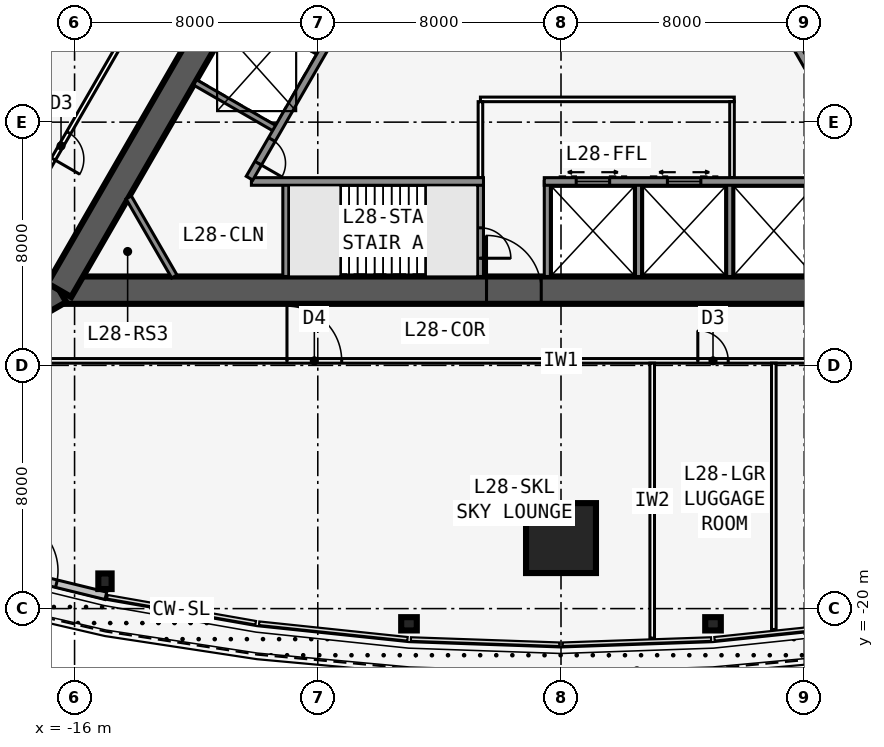
"""IFC4 building model, lengths in metres.
Left out: names, types, materials, properties, quantities, classifications, styles, units other than length and angle.
Written with IfcOpenShell. Run it as: python <this file> out.ifc"""

import sys

from ifc_helpers import new_model, si_unit, direction, frame, frame_2d, origin, origin_2d, place, context, subcontext, project, spatial, rectangle, i_section, extrude, element, fill, save


model = new_model("IFC4")
c1 = context("Model", 3, precision=1e-05, world=origin(), true_north=direction((0.0, 1.0)))
c2 = subcontext(c1, "Body", "Model", "MODEL_VIEW")
j1 = project(units=[si_unit("LENGTHUNIT", "METRE"), si_unit("PLANEANGLEUNIT", "RADIAN")], contexts=[c1])
p1 = place(None, origin())
s1 = spatial("IfcSite", under=j1, at=p1, CompositionType="ELEMENT")
p2 = place(p1, origin())
s2 = spatial("IfcBuilding", under=s1, at=p2, CompositionType="ELEMENT")
p3 = place(p2, frame((0.0, 0.0, 109.7)))
s3 = spatial("IfcBuildingStorey", under=s2, at=p3, CompositionType="ELEMENT", Elevation=109.7)
p4 = place(p3, frame((-16.5, -9.526, 0.0), z_axis=(0.0, 0.0, 1.0), x_axis=(1.0, 0.0, 0.0)))
e1 = element("IfcWall", 1, at=p4, inside=s3, PredefinedType="SHEAR", context=c2, shape_type="SweptSolid", body=[
    extrude(rectangle(XDim=33.0, YDim=0.9, at=frame_2d((16.5, 0.0))), origin(), (0.0, 0.0, 1.0), 5.0),
])
p5 = place(p4, frame((14.05, 0.0, 0.0)))
e2 = element("IfcOpeningElement", 2, at=p5, cuts=e1, PredefinedType="OPENING", context=c2, shape_type="SweptSolid", body=[
    extrude(rectangle(XDim=1.8, YDim=2.13, at=frame_2d((0.9, 1.065))), frame((0.0, 0.46, 0.0), z_axis=(0.0, -1.0, 0.0), x_axis=(1.0, 0.0, 0.0)), (0.0, 0.0, 1.0), 0.92),
])
p6 = place(p3, frame((-10.183, -5.951, 0.0), z_axis=(0.0, 0.0, 1.0), x_axis=(1.0, 0.0, 0.0)))
e3 = element("IfcWall", 3, at=p6, inside=s3, PredefinedType="SOLIDWALL", context=c2, shape_type="SweptSolid", body=[
    extrude(rectangle(XDim=7.633, YDim=0.25, at=frame_2d((3.816, 0.0))), origin(), (0.0, 0.0, 1.0), 4.835),
])
p7 = place(p3, frame((-0.55, -5.951, 0.0), z_axis=(0.0, 0.0, 1.0), x_axis=(1.0, 0.0, 0.0)))
e4 = element("IfcWall", 4, at=p7, inside=s3, PredefinedType="SOLIDWALL", context=c2, shape_type="SweptSolid", body=[
    extrude(rectangle(XDim=10.733, YDim=0.25, at=frame_2d((5.366, 0.0))), origin(), (0.0, 0.0, 1.0), 4.835),
])
p8 = place(p7, frame((9.314, 0.0, 0.0)))
e5 = element("IfcOpeningElement", 5, at=p8, cuts=e4, PredefinedType="OPENING", context=c2, shape_type="SweptSolid", body=[
    extrude(rectangle(XDim=0.9, YDim=2.13, at=frame_2d((0.45, 1.065))), frame((0.0, 0.135, 0.0), z_axis=(0.0, -1.0, 0.0), x_axis=(1.0, 0.0, 0.0)), (0.0, 0.0, 1.0), 0.27),
])
p9 = place(p7, frame((1.05, 0.0, 0.0)))
e6 = element("IfcOpeningElement", 6, at=p9, cuts=e4, PredefinedType="OPENING", context=c2, shape_type="SweptSolid", body=[
    extrude(rectangle(XDim=1.1, YDim=2.13, at=frame_2d((0.55, 1.065))), frame((0.0, 0.135, 0.0), z_axis=(0.0, -1.0, 0.0), x_axis=(1.0, 0.0, 0.0)), (0.0, 0.0, 1.0), 0.27),
])
p10 = place(p7, frame((4.05, 0.0, 0.0)))
e7 = element("IfcOpeningElement", 7, at=p10, cuts=e4, PredefinedType="OPENING", context=c2, shape_type="SweptSolid", body=[
    extrude(rectangle(XDim=1.1, YDim=2.13, at=frame_2d((0.55, 1.065))), frame((0.0, 0.135, 0.0), z_axis=(0.0, -1.0, 0.0), x_axis=(1.0, 0.0, 0.0)), (0.0, 0.0, 1.0), 0.27),
])
p11 = place(p3, frame((-9.05, -5.951, 0.0), z_axis=(0.0, 0.0, 1.0), x_axis=(0.0, -1.0, 0.0)))
e8 = element("IfcWall", 8, at=p11, inside=s3, PredefinedType="SOLIDWALL", context=c2, shape_type="SweptSolid", body=[
    extrude(rectangle(XDim=3.125, YDim=0.2, at=frame_2d((1.562, 0.0))), origin(), (0.0, 0.0, 1.0), 4.835),
])
p12 = place(p3, frame((-2.65, -5.951, 0.0), z_axis=(0.0, 0.0, 1.0), x_axis=(0.0, -1.0, 0.0)))
e9 = element("IfcWall", 9, at=p12, inside=s3, PredefinedType="SOLIDWALL", context=c2, shape_type="SweptSolid", body=[
    extrude(rectangle(XDim=3.125, YDim=0.2, at=frame_2d((1.562, 0.0))), origin(), (0.0, 0.0, 1.0), 4.835),
])
p13 = place(p12, frame((1.525, 0.0, 0.0)))
e10 = element("IfcOpeningElement", 10, at=p13, cuts=e9, PredefinedType="OPENING", context=c2, shape_type="SweptSolid", body=[
    extrude(rectangle(XDim=1.0, YDim=2.13, at=frame_2d((0.5, 1.065))), frame((0.0, 0.11, 0.0), z_axis=(0.0, -1.0, 0.0), x_axis=(1.0, 0.0, 0.0)), (0.0, 0.0, 1.0), 0.22),
])
for number, where, z_axis, x_axis in (
    (11, (-0.45, -5.951, 0.0), (0.0, 0.0, 1.0), (0.0, -1.0, 0.0)),
    (12, (2.55, -5.951, 0.0), (0.0, 0.0, 1.0), (0.0, -1.0, 0.0)),
    (13, (5.55, -5.951, 0.0), (0.0, 0.0, 1.0), (0.0, -1.0, 0.0)),
):
    element("IfcWall", number, at=place(p3, frame(where, z_axis=z_axis, x_axis=x_axis)), inside=s3, PredefinedType="SOLIDWALL", context=c2, shape_type="SweptSolid", body=[
        extrude(rectangle(XDim=3.125, YDim=0.2, at=frame_2d((1.562, 0.0))), origin(), (0.0, 0.0, 1.0), 4.835),
    ])
p14 = place(p3, frame((16.5, -9.526, 0.0), z_axis=(0.0, 0.0, 1.0), x_axis=(-0.499999749417, 0.866025548458, 0.0)))
e14 = element("IfcWall", 14, at=p14, inside=s3, PredefinedType="SHEAR", context=c2, shape_type="SweptSolid", body=[
    extrude(rectangle(XDim=33.0, YDim=0.9, at=frame_2d((16.5, 0.0))), origin(), (0.0, 0.0, 1.0), 5.0),
])
p15 = place(p14, frame((14.15, 0.0, 0.0)))
e15 = element("IfcOpeningElement", 15, at=p15, cuts=e14, PredefinedType="OPENING", context=c2, shape_type="SweptSolid", body=[
    extrude(rectangle(XDim=1.8, YDim=2.13, at=frame_2d((0.9, 1.065))), frame((0.0, 0.46, 0.0), z_axis=(0.0, -1.0, 0.0), x_axis=(1.0, 0.0, 0.0)), (0.0, 0.0, 1.0), 0.92),
])
p16 = place(p14, frame((12.6, 0.0, 0.0)))
e16 = element("IfcOpeningElement", 16, at=p16, cuts=e14, PredefinedType="OPENING", context=c2, shape_type="SweptSolid", body=[
    extrude(rectangle(XDim=1.0, YDim=2.13, at=frame_2d((0.5, 1.065))), frame((0.0, 0.46, 0.0), z_axis=(0.0, -1.0, 0.0), x_axis=(1.0, 0.0, 0.0)), (0.0, 0.0, 1.0), 0.92),
])
p17 = place(p3, frame((10.245, -5.843, 0.0), z_axis=(0.0, 0.0, 1.0), x_axis=(-0.499993009313, 0.866029439822, 0.0)))
e17 = element("IfcWall", 17, at=p17, inside=s3, PredefinedType="SOLIDWALL", context=c2, shape_type="SweptSolid", body=[
    extrude(rectangle(XDim=7.733, YDim=0.25, at=frame_2d((3.866, 0.0))), origin(), (0.0, 0.0, 1.0), 4.835),
])
p18 = place(p3, frame((0.0, 19.052, 0.0), z_axis=(0.0, 0.0, 1.0), x_axis=(-0.499999749417, -0.866025548458, 0.0)))
e18 = element("IfcWall", 18, at=p18, inside=s3, PredefinedType="SHEAR", context=c2, shape_type="SweptSolid", body=[
    extrude(rectangle(XDim=33.0, YDim=0.9, at=frame_2d((16.5, 0.0))), origin(), (0.0, 0.0, 1.0), 5.0),
])
p19 = place(p18, frame((14.15, 0.0, 0.0)))
e19 = element("IfcOpeningElement", 19, at=p19, cuts=e18, PredefinedType="OPENING", context=c2, shape_type="SweptSolid", body=[
    extrude(rectangle(XDim=1.8, YDim=2.13, at=frame_2d((0.9, 1.065))), frame((0.0, 0.46, 0.0), z_axis=(0.0, -1.0, 0.0), x_axis=(1.0, 0.0, 0.0)), (0.0, 0.0, 1.0), 0.92),
])
p20 = place(p18, frame((12.6, 0.0, 0.0)))
e20 = element("IfcOpeningElement", 20, at=p20, cuts=e18, PredefinedType="OPENING", context=c2, shape_type="SweptSolid", body=[
    extrude(rectangle(XDim=1.0, YDim=2.13, at=frame_2d((0.5, 1.065))), frame((0.0, 0.46, 0.0), z_axis=(0.0, -1.0, 0.0), x_axis=(1.0, 0.0, 0.0)), (0.0, 0.0, 1.0), 0.92),
])
p21 = place(p3, frame((-4.929, 3.365, 0.0), z_axis=(0.0, 0.0, 1.0), x_axis=(-0.499991433582, -0.866030349552, 0.0)))
e21 = element("IfcWall", 21, at=p21, inside=s3, PredefinedType="SOLIDWALL", context=c2, shape_type="SweptSolid", body=[
    extrude(rectangle(XDim=10.633, YDim=0.25, at=frame_2d((5.316, 0.0))), origin(), (0.0, 0.0, 1.0), 4.835),
])
p22 = place(p21, frame((9.164, 0.0, 0.0)))
e22 = element("IfcOpeningElement", 22, at=p22, cuts=e21, PredefinedType="OPENING", context=c2, shape_type="SweptSolid", body=[
    extrude(rectangle(XDim=0.9, YDim=2.13, at=frame_2d((0.45, 1.065))), frame((0.0, 0.135, 0.0), z_axis=(0.0, -1.0, 0.0), x_axis=(1.0, 0.0, 0.0)), (0.0, 0.0, 1.0), 0.27),
])
p23 = place(p21, frame((1.0, 0.0, 0.0)))
e23 = element("IfcOpeningElement", 23, at=p23, cuts=e21, PredefinedType="OPENING", context=c2, shape_type="SweptSolid", body=[
    extrude(rectangle(XDim=1.1, YDim=2.13, at=frame_2d((0.55, 1.065))), frame((0.0, 0.135, 0.0), z_axis=(0.0, -1.0, 0.0), x_axis=(1.0, 0.0, 0.0)), (0.0, 0.0, 1.0), 0.27),
])
p24 = place(p21, frame((3.9, 0.0, 0.0)))
e24 = element("IfcOpeningElement", 24, at=p24, cuts=e21, PredefinedType="OPENING", context=c2, shape_type="SweptSolid", body=[
    extrude(rectangle(XDim=1.1, YDim=2.13, at=frame_2d((0.55, 1.065))), frame((0.0, 0.135, 0.0), z_axis=(0.0, -1.0, 0.0), x_axis=(1.0, 0.0, 0.0)), (0.0, 0.0, 1.0), 0.27),
])
for number, where, z_axis, x_axis in (
    (25, (-7.879, -1.744, 0.0), (0.0, 0.0, 1.0), (-0.866, 0.5, 0.0)),
    (26, (-9.329, -4.256, 0.0), (0.0, 0.0, 1.0), (-0.866, 0.5, 0.0)),
):
    element("IfcWall", number, at=place(p3, frame(where, z_axis=z_axis, x_axis=x_axis)), inside=s3, PredefinedType="SOLIDWALL", context=c2, shape_type="SweptSolid", body=[
        extrude(rectangle(XDim=3.125, YDim=0.2, at=frame_2d((1.562, 0.0))), origin(), (0.0, 0.0, 1.0), 4.835),
    ])
p25 = place(p3, frame((-16.5, -9.526, 0.0), z_axis=(0.0, 0.0, 1.0), x_axis=(-0.866031398331, -0.499989616998, 0.0)))
e27 = element("IfcWall", 27, at=p25, inside=s3, PredefinedType="SHEAR", context=c2, shape_type="SweptSolid", body=[
    extrude(rectangle(XDim=4.746, YDim=0.9, at=frame_2d((2.373, 0.0))), origin(), (0.0, 0.0, 1.0), 5.0),
])
p26 = place(p25, frame((1.8, 0.0, 0.0)))
e28 = element("IfcOpeningElement", 28, at=p26, cuts=e27, PredefinedType="OPENING", context=c2, shape_type="SweptSolid", body=[
    extrude(rectangle(XDim=1.8, YDim=2.13, at=frame_2d((0.9, 1.065))), frame((0.0, 0.46, 0.0), z_axis=(0.0, -1.0, 0.0), x_axis=(1.0, 0.0, 0.0)), (0.0, 0.0, 1.0), 0.92),
])
for number, where, z_axis, x_axis in (
    (29, (-15.0, -19.1, 0.0), (0.0, 0.0, 1.0), (1.0, 0.0, 0.0)),
    (30, (-5.0, -20.5, 0.0), (0.0, 0.0, 1.0), (0.0, -1.0, 0.0)),
    (31, (5.0, -20.5, 0.0), (0.0, 0.0, 1.0), (0.0, -1.0, 0.0)),
):
    element("IfcColumn", number, at=place(p3, frame(where, z_axis=z_axis, x_axis=x_axis)), inside=s3, PredefinedType="COLUMN", context=c2, shape_type="SweptSolid", body=[
        extrude(i_section(OverallWidth=0.437, OverallDepth=0.513, WebThickness=0.061, FlangeThickness=0.097, at=origin_2d()), origin(), (0.0, 0.0, 1.0), 5.0),
    ])
p27 = place(p3, frame((0.0, -17.68, 0.0), z_axis=(0.0, 0.0, 1.0), x_axis=(0.0, -1.0, 0.0)))
e32 = element("IfcColumn", 32, at=p27, inside=s3, PredefinedType="COLUMN", context=c2, shape_type="SweptSolid", body=[
    extrude(rectangle(XDim=2.3, YDim=2.3, at=origin_2d()), origin(), (0.0, 0.0, 1.0), 5.0),
])
p28 = place(p3, frame((-19.97, -18.354, 0.0), z_axis=(0.0, 0.0, 1.0), x_axis=(0.971270024053, -0.237980126011, 0.0)))
e33 = element("IfcWall", 33, at=p28, inside=s3, PredefinedType="STANDARD", context=c2, shape_type="SweptSolid", body=[
    extrude(rectangle(XDim=5.148, YDim=0.25, at=frame_2d((2.574, 0.0))), origin(), (0.0, 0.0, 1.0), 4.835),
])
p29 = place(p28, frame((1.674, 0.0, 0.0)))
e34 = element("IfcOpeningElement", 34, at=p29, cuts=e33, PredefinedType="OPENING", context=c2, shape_type="SweptSolid", body=[
    extrude(rectangle(XDim=1.8, YDim=2.4, at=frame_2d((0.9, 1.2))), frame((0.0, 0.135, 0.0), z_axis=(0.0, -1.0, 0.0), x_axis=(1.0, 0.0, 0.0)), (0.0, 0.0, 1.0), 0.27),
])
p30 = place(p3, frame((-19.527, -11.851, 0.0), z_axis=(0.0, 0.0, 1.0), x_axis=(1.0, 0.0, 0.0)))
e35 = element("IfcWall", 35, at=p30, inside=s3, PredefinedType="PARTITIONING", context=c2, shape_type="SweptSolid", body=[
    extrude(rectangle(XDim=39.054, YDim=0.15, at=frame_2d((19.527, 0.0))), origin(), (0.0, 0.0, 1.0), 4.835),
])
p31 = place(p30, frame((10.513, 0.0, 0.0)))
e36 = element("IfcOpeningElement", 36, at=p31, cuts=e35, PredefinedType="OPENING", context=c2, shape_type="SweptSolid", body=[
    extrude(rectangle(XDim=1.8, YDim=2.13, at=frame_2d((0.9, 1.065))), frame((0.0, 0.085, 0.0), z_axis=(0.0, -1.0, 0.0), x_axis=(1.0, 0.0, 0.0)), (0.0, 0.0, 1.0), 0.17),
])
p32 = place(p30, frame((24.027, 0.0, 0.0)))
e37 = element("IfcOpeningElement", 37, at=p32, cuts=e35, PredefinedType="OPENING", context=c2, shape_type="SweptSolid", body=[
    extrude(rectangle(XDim=1.0, YDim=2.13, at=frame_2d((0.5, 1.065))), frame((0.0, 0.085, 0.0), z_axis=(0.0, -1.0, 0.0), x_axis=(1.0, 0.0, 0.0)), (0.0, 0.0, 1.0), 0.17),
])
p33 = place(p30, frame((31.74, 0.0, 0.0)))
e38 = element("IfcOpeningElement", 38, at=p33, cuts=e35, PredefinedType="OPENING", context=c2, shape_type="SweptSolid", body=[
    extrude(rectangle(XDim=1.8, YDim=2.13, at=frame_2d((0.9, 1.065))), frame((0.0, 0.085, 0.0), z_axis=(0.0, -1.0, 0.0), x_axis=(1.0, 0.0, 0.0)), (0.0, 0.0, 1.0), 0.17),
])
p34 = place(p3, frame((3.0, -11.926, 0.0), z_axis=(0.0, 0.0, 1.0), x_axis=(0.0, -1.0, 0.0)))
e39 = element("IfcWall", 39, at=p34, inside=s3, PredefinedType="PARTITIONING", context=c2, shape_type="SweptSolid", body=[
    extrude(rectangle(XDim=9.046, YDim=0.15, at=frame_2d((4.523, 0.0))), origin(), (0.0, 0.0, 1.0), 4.835),
])
p35 = place(p3, frame((7.0, -11.926, 0.0), z_axis=(0.0, 0.0, 1.0), x_axis=(0.0, -1.0, 0.0)))
e40 = element("IfcWall", 40, at=p35, inside=s3, PredefinedType="PARTITIONING", context=c2, shape_type="SweptSolid", body=[
    extrude(rectangle(XDim=8.76, YDim=0.15, at=frame_2d((4.38, 0.0))), origin(), (0.0, 0.0, 1.0), 4.835),
])
p36 = place(p3, frame((20.027, -10.985, 0.0), z_axis=(0.0, 0.0, 1.0), x_axis=(-0.500001677587, 0.866024435227, 0.0)))
e41 = element("IfcWall", 41, at=p36, inside=s3, PredefinedType="PARTITIONING", context=c2, shape_type="SweptSolid", body=[
    extrude(rectangle(XDim=39.054, YDim=0.15, at=frame_2d((19.527, 0.0))), origin(), (0.0, 0.0, 1.0), 4.835),
])
p37 = place(p36, frame((6.513, 0.0, 0.0)))
e42 = element("IfcOpeningElement", 42, at=p37, cuts=e41, PredefinedType="OPENING", context=c2, shape_type="SweptSolid", body=[
    extrude(rectangle(XDim=1.8, YDim=2.13, at=frame_2d((0.9, 1.065))), frame((0.0, 0.085, 0.0), z_axis=(0.0, -1.0, 0.0), x_axis=(1.0, 0.0, 0.0)), (0.0, 0.0, 1.0), 0.17),
])
p38 = place(p36, frame((16.527, 0.0, 0.0)))
e43 = element("IfcOpeningElement", 43, at=p38, cuts=e41, PredefinedType="OPENING", context=c2, shape_type="SweptSolid", body=[
    extrude(rectangle(XDim=1.0, YDim=2.13, at=frame_2d((0.5, 1.065))), frame((0.0, 0.085, 0.0), z_axis=(0.0, -1.0, 0.0), x_axis=(1.0, 0.0, 0.0)), (0.0, 0.0, 1.0), 0.17),
])
p39 = place(p36, frame((21.527, 0.0, 0.0)))
e44 = element("IfcOpeningElement", 44, at=p39, cuts=e41, PredefinedType="OPENING", context=c2, shape_type="SweptSolid", body=[
    extrude(rectangle(XDim=1.0, YDim=2.13, at=frame_2d((0.5, 1.065))), frame((0.0, 0.085, 0.0), z_axis=(0.0, -1.0, 0.0), x_axis=(1.0, 0.0, 0.0)), (0.0, 0.0, 1.0), 0.17),
])
p40 = place(p36, frame((25.527, 0.0, 0.0)))
e45 = element("IfcOpeningElement", 45, at=p40, cuts=e41, PredefinedType="OPENING", context=c2, shape_type="SweptSolid", body=[
    extrude(rectangle(XDim=1.0, YDim=2.13, at=frame_2d((0.5, 1.065))), frame((0.0, 0.085, 0.0), z_axis=(0.0, -1.0, 0.0), x_axis=(1.0, 0.0, 0.0)), (0.0, 0.0, 1.0), 0.17),
])
p41 = place(p36, frame((32.24, 0.0, 0.0)))
e46 = element("IfcOpeningElement", 46, at=p41, cuts=e41, PredefinedType="OPENING", context=c2, shape_type="SweptSolid", body=[
    extrude(rectangle(XDim=1.8, YDim=2.13, at=frame_2d((0.9, 1.065))), frame((0.0, 0.085, 0.0), z_axis=(0.0, -1.0, 0.0), x_axis=(1.0, 0.0, 0.0)), (0.0, 0.0, 1.0), 0.17),
])
p42 = place(p3, frame((-0.5, 22.836, 0.0), z_axis=(0.0, 0.0, 1.0), x_axis=(-0.500001677587, -0.866024435227, 0.0)))
e47 = element("IfcWall", 47, at=p42, inside=s3, PredefinedType="PARTITIONING", context=c2, shape_type="SweptSolid", body=[
    extrude(rectangle(XDim=39.054, YDim=0.15, at=frame_2d((19.527, 0.0))), origin(), (0.0, 0.0, 1.0), 4.835),
])
p43 = place(p42, frame((6.414, 0.0, 0.0)))
e48 = element("IfcOpeningElement", 48, at=p43, cuts=e47, PredefinedType="OPENING", context=c2, shape_type="SweptSolid", body=[
    extrude(rectangle(XDim=1.0, YDim=2.13, at=frame_2d((0.5, 1.065))), frame((0.0, 0.085, 0.0), z_axis=(0.0, -1.0, 0.0), x_axis=(1.0, 0.0, 0.0)), (0.0, 0.0, 1.0), 0.17),
])
p44 = place(p42, frame((15.527, 0.0, 0.0)))
e49 = element("IfcOpeningElement", 49, at=p44, cuts=e47, PredefinedType="OPENING", context=c2, shape_type="SweptSolid", body=[
    extrude(rectangle(XDim=1.0, YDim=2.13, at=frame_2d((0.5, 1.065))), frame((0.0, 0.085, 0.0), z_axis=(0.0, -1.0, 0.0), x_axis=(1.0, 0.0, 0.0)), (0.0, 0.0, 1.0), 0.17),
])
p45 = place(p42, frame((21.277, 0.0, 0.0)))
e50 = element("IfcOpeningElement", 50, at=p45, cuts=e47, PredefinedType="OPENING", context=c2, shape_type="SweptSolid", body=[
    extrude(rectangle(XDim=1.0, YDim=2.13, at=frame_2d((0.5, 1.065))), frame((0.0, 0.085, 0.0), z_axis=(0.0, -1.0, 0.0), x_axis=(1.0, 0.0, 0.0)), (0.0, 0.0, 1.0), 0.17),
])
p46 = place(p42, frame((31.39, 0.0, 0.0)))
e51 = element("IfcOpeningElement", 51, at=p46, cuts=e47, PredefinedType="OPENING", context=c2, shape_type="SweptSolid", body=[
    extrude(rectangle(XDim=1.0, YDim=2.13, at=frame_2d((0.5, 1.065))), frame((0.0, 0.085, 0.0), z_axis=(0.0, -1.0, 0.0), x_axis=(1.0, 0.0, 0.0)), (0.0, 0.0, 1.0), 0.17),
])
p47 = place(p3, frame((-2.65, -3.251, 0.0), z_axis=(0.0, 0.0, 1.0), x_axis=(1.0, 0.0, 0.0)))
e52 = element("IfcWall", 52, at=p47, inside=s3, PredefinedType="PARTITIONING", context=c2, shape_type="SweptSolid", body=[
    extrude(rectangle(XDim=8.35, YDim=0.15, at=frame_2d((4.175, 0.0))), origin(), (0.0, 0.0, 1.0), 4.835),
])
for number, where, z_axis, x_axis in (
    (53, (-2.65, -5.826, 0.0), (0.0, 0.0, 1.0), (0.0, 1.0, 0.0)),
    (54, (5.625, -5.826, 0.0), (0.0, 0.0, 1.0), (0.0, 1.0, 0.0)),
):
    element("IfcWall", number, at=place(p3, frame(where, z_axis=z_axis, x_axis=x_axis)), inside=s3, PredefinedType="PARTITIONING", context=c2, shape_type="SweptSolid", body=[
        extrude(rectangle(XDim=2.5, YDim=0.15, at=frame_2d((1.25, 0.0))), origin(), (0.0, 0.0, 1.0), 4.835),
    ])
p48 = place(p3, frame((-12.719, -9.076, 0.0), z_axis=(0.0, 0.0, 1.0), x_axis=(-0.499952404951, 0.866052881055, 0.0)))
e55 = element("IfcWall", 55, at=p48, inside=s3, PredefinedType="SOLIDWALL", context=c2, shape_type="SweptSolid", body=[
    extrude(rectangle(XDim=3.002, YDim=0.2, at=frame_2d((1.501, 0.0))), origin(), (0.0, 0.0, 1.0), 4.835),
])
p49 = place(p3, frame((-7.247, -7.576, 0.0), z_axis=(0.0, 0.0, 1.0), x_axis=(1.0, 0.0, 0.0)))
e56 = element("IfcWall", 56, at=p49, inside=s3, PredefinedType="SOLIDWALL", context=c2, shape_type="SweptSolid", body=[
    extrude(rectangle(XDim=2.794, YDim=0.1, at=frame_2d((1.397, 0.0))), origin(), (0.0, 0.0, 1.0), 5.0),
])
p50 = place(p29, origin())
e57 = element("IfcDoor", 57, at=p50, inside=s3, OperationType="DOUBLE_DOOR_SINGLE_SWING", PredefinedType="DOOR", context=c2, shape_type="SweptSolid", body=[
    extrude(rectangle(XDim=1.8, YDim=2.4, at=frame_2d((0.9, 1.2))), frame((0.0, 0.025, 0.0), z_axis=(0.0, -1.0, 0.0), x_axis=(1.0, 0.0, 0.0)), (0.0, 0.0, 1.0), 0.05),
])
fill(e34, e57)
p51 = place(p31, origin())
e58 = element("IfcDoor", 58, at=p51, inside=s3, OperationType="DOUBLE_DOOR_SINGLE_SWING", PredefinedType="DOOR", context=c2, shape_type="SweptSolid", body=[
    extrude(rectangle(XDim=1.8, YDim=2.13, at=frame_2d((0.9, 1.065))), frame((0.0, 0.025, 0.0), z_axis=(0.0, -1.0, 0.0), x_axis=(1.0, 0.0, 0.0)), (0.0, 0.0, 1.0), 0.05),
])
fill(e36, e58)
p52 = place(p32, origin())
e59 = element("IfcDoor", 59, at=p52, inside=s3, OperationType="SINGLE_SWING_LEFT", PredefinedType="DOOR", context=c2, shape_type="SweptSolid", body=[
    extrude(rectangle(XDim=1.0, YDim=2.13, at=frame_2d((0.5, 1.065))), frame((0.0, 0.025, 0.0), z_axis=(0.0, -1.0, 0.0), x_axis=(1.0, 0.0, 0.0)), (0.0, 0.0, 1.0), 0.05),
])
fill(e37, e59)
p53 = place(p46, origin())
e60 = element("IfcDoor", 60, at=p53, inside=s3, OperationType="SINGLE_SWING_RIGHT", PredefinedType="DOOR", context=c2, shape_type="SweptSolid", body=[
    extrude(rectangle(XDim=1.0, YDim=2.13, at=frame_2d((0.5, 1.065))), frame((0.0, 0.025, 0.0), z_axis=(0.0, -1.0, 0.0), x_axis=(1.0, 0.0, 0.0)), (0.0, 0.0, 1.0), 0.05),
])
fill(e51, e60)
p54 = place(p5, origin())
e61 = element("IfcDoor", 61, at=p54, inside=s3, OperationType="DOUBLE_DOOR_SINGLE_SWING", PredefinedType="DOOR", context=c2, shape_type="SweptSolid", body=[
    extrude(rectangle(XDim=1.8, YDim=2.13, at=frame_2d((0.9, 1.065))), frame((0.0, 0.025, 0.0), z_axis=(0.0, -1.0, 0.0), x_axis=(1.0, 0.0, 0.0)), (0.0, 0.0, 1.0), 0.05),
])
fill(e2, e61)
p55 = place(p13, origin())
e62 = element("IfcDoor", 62, at=p55, inside=s3, OperationType="SINGLE_SWING_RIGHT", PredefinedType="DOOR", context=c2, shape_type="SweptSolid", body=[
    extrude(rectangle(XDim=1.0, YDim=2.13, at=frame_2d((0.5, 1.065))), frame((0.0, 0.025, 0.0), z_axis=(0.0, -1.0, 0.0), x_axis=(1.0, 0.0, 0.0)), (0.0, 0.0, 1.0), 0.05),
])
fill(e10, e62)
p56 = place(p22, origin())
e63 = element("IfcDoor", 63, at=p56, inside=s3, OperationType="SINGLE_SWING_RIGHT", PredefinedType="DOOR", context=c2, shape_type="SweptSolid", body=[
    extrude(rectangle(XDim=0.9, YDim=2.13, at=frame_2d((0.45, 1.065))), frame((0.0, 0.025, 0.0), z_axis=(0.0, -1.0, 0.0), x_axis=(1.0, 0.0, 0.0)), (0.0, 0.0, 1.0), 0.05),
])
fill(e22, e63)
p57 = place(p9, origin())
e64 = element("IfcDoor", 64, at=p57, inside=s3, OperationType="DOUBLE_DOOR_SLIDING", PredefinedType="USERDEFINED", context=c2, shape_type="SweptSolid", body=[
    extrude(rectangle(XDim=1.1, YDim=2.13, at=frame_2d((0.55, 1.065))), frame((0.0, 0.025, 0.0), z_axis=(0.0, -1.0, 0.0), x_axis=(1.0, 0.0, 0.0)), (0.0, 0.0, 1.0), 0.05),
])
fill(e6, e64)
p58 = place(p10, origin())
e65 = element("IfcDoor", 65, at=p58, inside=s3, OperationType="DOUBLE_DOOR_SLIDING", PredefinedType="USERDEFINED", context=c2, shape_type="SweptSolid", body=[
    extrude(rectangle(XDim=1.1, YDim=2.13, at=frame_2d((0.55, 1.065))), frame((0.0, 0.025, 0.0), z_axis=(0.0, -1.0, 0.0), x_axis=(1.0, 0.0, 0.0)), (0.0, 0.0, 1.0), 0.05),
])
fill(e7, e65)
save(model, sys.argv[1])
